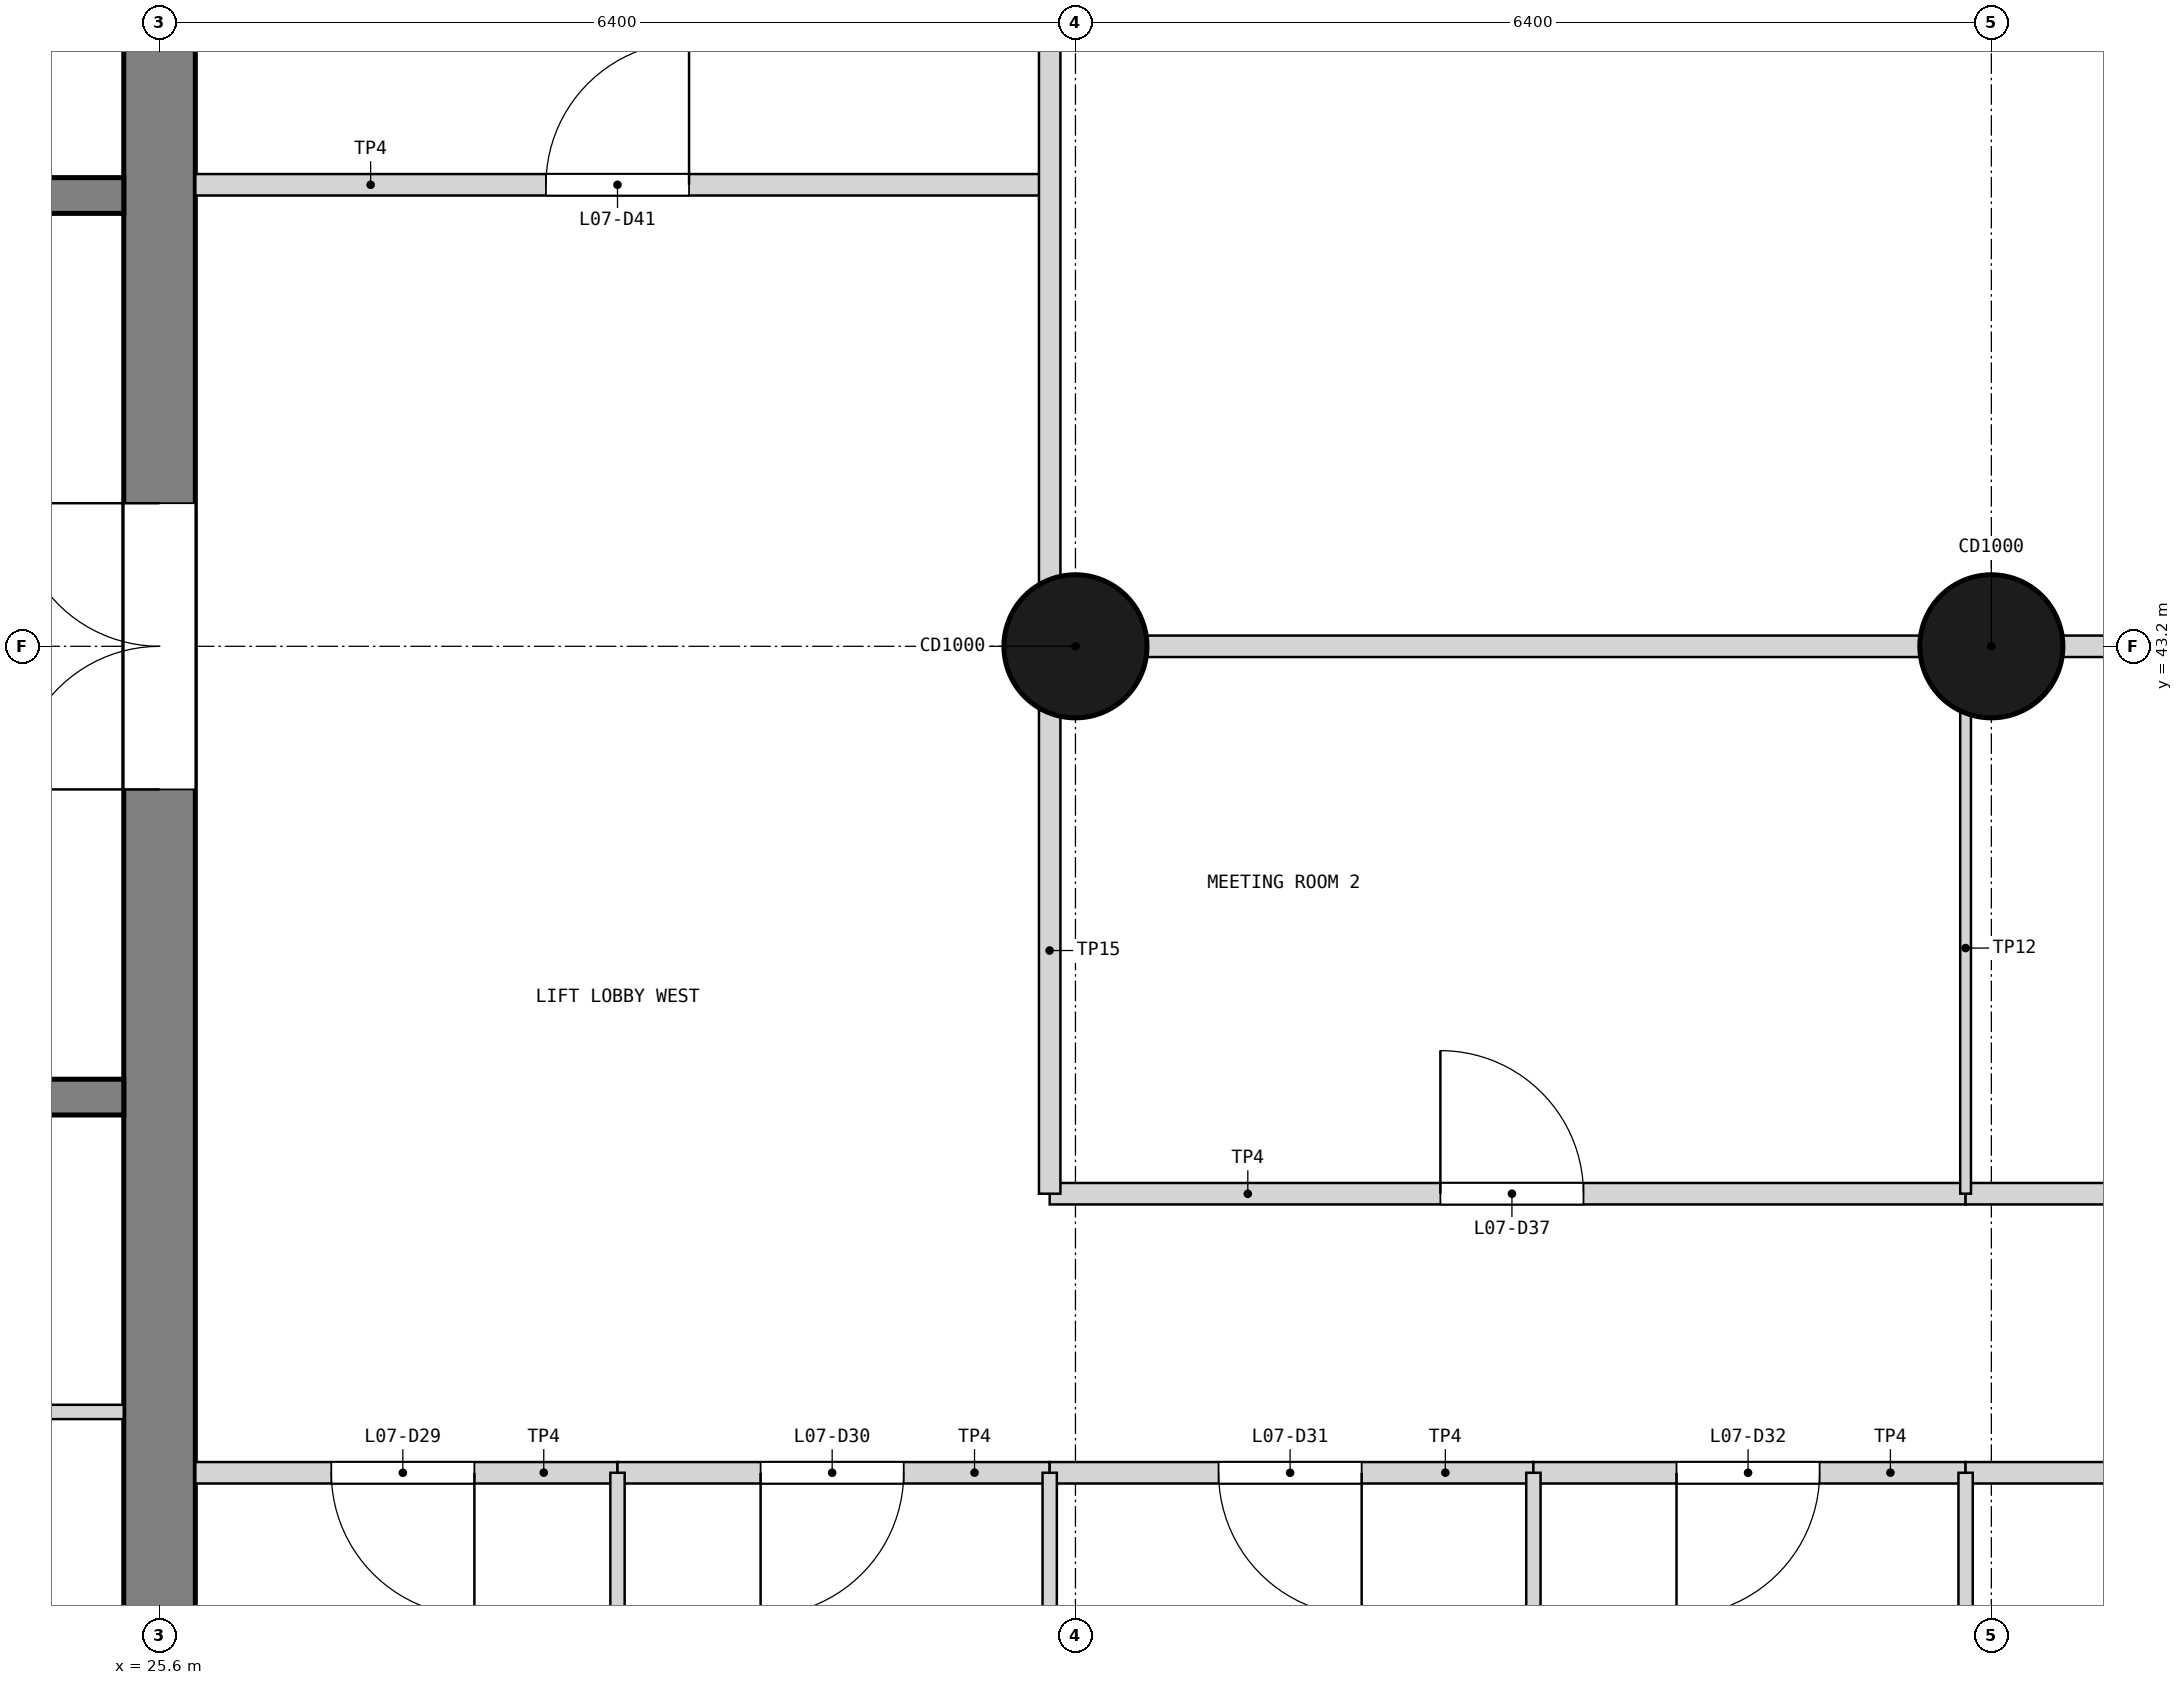
"""IFC4 building model, lengths in metres.
Left out: names, types, materials, properties, quantities, classifications, styles, units other than length and angle.
Written with IfcOpenShell. Run it as: python <this file> out.ifc"""

import sys

from ifc_helpers import new_model, si_unit, direction, frame, frame_2d, origin, origin_2d, place, context, subcontext, project, spatial, rectangle, circle, extrude, element, fill, save


model = new_model("IFC4")
c1 = context("Model", 3, precision=1e-05, world=origin(), true_north=direction((0.0, 1.0)))
c2 = subcontext(c1, "Body", "Model", "MODEL_VIEW")
j1 = project(units=[si_unit("LENGTHUNIT", "METRE"), si_unit("PLANEANGLEUNIT", "RADIAN")], contexts=[c1])
p1 = place(None, origin())
s1 = spatial("IfcSite", under=j1, at=p1, CompositionType="ELEMENT")
p2 = place(p1, origin())
s2 = spatial("IfcBuilding", under=s1, at=p2, CompositionType="ELEMENT")
p3 = place(p2, frame((0.0, 0.0, 28.8)))
s3 = spatial("IfcBuildingStorey", under=s2, at=p3, CompositionType="ELEMENT", Elevation=28.8)
p4 = place(p3, frame((25.6, 33.85, 0.0), z_axis=(0.0, 0.0, 1.0), x_axis=(0.0, 1.0, 0.0)))
e1 = element("IfcWall", 1, at=p4, inside=s3, PredefinedType="SHEAR", context=c2, shape_type="SweptSolid", body=[
    extrude(rectangle(XDim=18.7, YDim=0.5, at=frame_2d((9.35, 0.0))), origin(), (0.0, 0.0, 1.0), 3.9),
])
p5 = place(p4, frame((8.35, 0.0, 0.0)))
e2 = element("IfcOpeningElement", 2, at=p5, cuts=e1, PredefinedType="OPENING", context=c2, shape_type="SweptSolid", body=[
    extrude(rectangle(XDim=2.0, YDim=2.1, at=frame_2d((1.0, 1.05))), frame((0.0, 0.26, 0.0), z_axis=(0.0, -1.0, 0.0), x_axis=(1.0, 0.0, 0.0)), (0.0, 0.0, 1.0), 0.52),
])
for number, where, z_axis, x_axis in (
    (3, (32.0, 43.2, 0.0), (0.0, 0.0, 1.0), (1.0, 0.0, 0.0)),
    (4, (38.4, 43.2, 0.0), (0.0, 0.0, 1.0), (1.0, 0.0, 0.0)),
):
    element("IfcColumn", number, at=place(p3, frame(where, z_axis=z_axis, x_axis=x_axis)), inside=s3, PredefinedType="COLUMN", context=c2, shape_type="SweptSolid", body=[
        extrude(circle(Radius=0.5, at=origin_2d()), origin(), (0.0, 0.0, 1.0), 3.9),
    ])
for number, where, z_axis, x_axis in (
    (5, (19.875, 40.05, 0.0), (0.0, 0.0, 1.0), (1.0, 0.0, 0.0)),
    (6, (19.875, 46.35, 0.0), (0.0, 0.0, 1.0), (1.0, 0.0, 0.0)),
):
    element("IfcWall", number, at=place(p3, frame(where, z_axis=z_axis, x_axis=x_axis)), inside=s3, PredefinedType="SOLIDWALL", context=c2, shape_type="SweptSolid", body=[
        extrude(rectangle(XDim=5.475, YDim=0.25, at=frame_2d((2.738, 0.0))), origin(), (0.0, 0.0, 1.0), 3.6),
    ])
p6 = place(p3, frame((21.675, 37.85, 0.0), z_axis=(0.0, 0.0, 1.0), x_axis=(1.0, 0.0, 0.0)))
e7 = element("IfcWall", 7, at=p6, inside=s3, PredefinedType="PARTITIONING", context=c2, shape_type="SweptSolid", body=[
    extrude(rectangle(XDim=3.675, YDim=0.1, at=frame_2d((1.837, 0.0))), origin(), (0.0, 0.0, 1.0), 3.6),
])
p7 = place(p3, frame((25.85, 37.425, 0.0), z_axis=(0.0, 0.0, 1.0), x_axis=(1.0, 0.0, 0.0)))
e8 = element("IfcWall", 8, at=p7, inside=s3, PredefinedType="PARTITIONING", context=c2, shape_type="SweptSolid", body=[
    extrude(rectangle(XDim=2.95, YDim=0.15, at=frame_2d((1.475, 0.0))), origin(), (0.0, 0.0, 1.0), 3.68),
])
p8 = place(p7, frame((0.95, 0.0, 0.0)))
e9 = element("IfcOpeningElement", 9, at=p8, cuts=e8, PredefinedType="OPENING", context=c2, shape_type="SweptSolid", body=[
    extrude(rectangle(XDim=1.0, YDim=2.1, at=frame_2d((0.5, 1.05))), frame((0.0, 0.085, 0.0), z_axis=(0.0, -1.0, 0.0), x_axis=(1.0, 0.0, 0.0)), (0.0, 0.0, 1.0), 0.17),
])
p9 = place(p3, frame((28.8, 37.425, 0.0), z_axis=(0.0, 0.0, 1.0), x_axis=(1.0, 0.0, 0.0)))
e10 = element("IfcWall", 10, at=p9, inside=s3, PredefinedType="PARTITIONING", context=c2, shape_type="SweptSolid", body=[
    extrude(rectangle(XDim=3.02, YDim=0.15, at=frame_2d((1.51, 0.0))), origin(), (0.0, 0.0, 1.0), 3.68),
])
p10 = place(p9, frame((1.0, 0.0, 0.0)))
e11 = element("IfcOpeningElement", 11, at=p10, cuts=e10, PredefinedType="OPENING", context=c2, shape_type="SweptSolid", body=[
    extrude(rectangle(XDim=1.0, YDim=2.1, at=frame_2d((0.5, 1.05))), frame((0.0, 0.085, 0.0), z_axis=(0.0, -1.0, 0.0), x_axis=(1.0, 0.0, 0.0)), (0.0, 0.0, 1.0), 0.17),
])
p11 = place(p3, frame((31.82, 37.425, 0.0), z_axis=(0.0, 0.0, 1.0), x_axis=(1.0, 0.0, 0.0)))
e12 = element("IfcWall", 12, at=p11, inside=s3, PredefinedType="PARTITIONING", context=c2, shape_type="SweptSolid", body=[
    extrude(rectangle(XDim=3.38, YDim=0.15, at=frame_2d((1.69, 0.0))), origin(), (0.0, 0.0, 1.0), 3.68),
])
p12 = place(p11, frame((1.18, 0.0, 0.0)))
e13 = element("IfcOpeningElement", 13, at=p12, cuts=e12, PredefinedType="OPENING", context=c2, shape_type="SweptSolid", body=[
    extrude(rectangle(XDim=1.0, YDim=2.1, at=frame_2d((0.5, 1.05))), frame((0.0, 0.085, 0.0), z_axis=(0.0, -1.0, 0.0), x_axis=(1.0, 0.0, 0.0)), (0.0, 0.0, 1.0), 0.17),
])
p13 = place(p3, frame((35.2, 37.425, 0.0), z_axis=(0.0, 0.0, 1.0), x_axis=(1.0, 0.0, 0.0)))
e14 = element("IfcWall", 14, at=p13, inside=s3, PredefinedType="PARTITIONING", context=c2, shape_type="SweptSolid", body=[
    extrude(rectangle(XDim=3.02, YDim=0.15, at=frame_2d((1.51, 0.0))), origin(), (0.0, 0.0, 1.0), 3.68),
])
p14 = place(p13, frame((1.0, 0.0, 0.0)))
e15 = element("IfcOpeningElement", 15, at=p14, cuts=e14, PredefinedType="OPENING", context=c2, shape_type="SweptSolid", body=[
    extrude(rectangle(XDim=1.0, YDim=2.1, at=frame_2d((0.5, 1.05))), frame((0.0, 0.085, 0.0), z_axis=(0.0, -1.0, 0.0), x_axis=(1.0, 0.0, 0.0)), (0.0, 0.0, 1.0), 0.17),
])
p15 = place(p3, frame((38.22, 37.425, 0.0), z_axis=(0.0, 0.0, 1.0), x_axis=(1.0, 0.0, 0.0)))
e16 = element("IfcWall", 16, at=p15, inside=s3, PredefinedType="PARTITIONING", context=c2, shape_type="SweptSolid", body=[
    extrude(rectangle(XDim=13.16, YDim=0.15, at=frame_2d((6.58, 0.0))), origin(), (0.0, 0.0, 1.0), 3.68),
])
p16 = place(p15, frame((2.43, 0.0, 0.0)))
e17 = element("IfcOpeningElement", 17, at=p16, cuts=e16, PredefinedType="OPENING", context=c2, shape_type="SweptSolid", body=[
    extrude(rectangle(XDim=1.8, YDim=2.1, at=frame_2d((0.9, 1.05))), frame((0.0, 0.085, 0.0), z_axis=(0.0, -1.0, 0.0), x_axis=(1.0, 0.0, 0.0)), (0.0, 0.0, 1.0), 0.17),
])
p17 = place(p15, frame((8.93, 0.0, 0.0)))
e18 = element("IfcOpeningElement", 18, at=p17, cuts=e16, PredefinedType="OPENING", context=c2, shape_type="SweptSolid", body=[
    extrude(rectangle(XDim=1.8, YDim=2.1, at=frame_2d((0.9, 1.05))), frame((0.0, 0.085, 0.0), z_axis=(0.0, -1.0, 0.0), x_axis=(1.0, 0.0, 0.0)), (0.0, 0.0, 1.0), 0.17),
])
p18 = place(p3, frame((28.8, 31.3, 0.0), z_axis=(0.0, 0.0, 1.0), x_axis=(0.0, 1.0, 0.0)))
e19 = element("IfcWall", 19, at=p18, inside=s3, PredefinedType="PARTITIONING", context=c2, shape_type="SweptSolid", body=[
    extrude(rectangle(XDim=6.125, YDim=0.1, at=frame_2d((3.062, 0.0))), origin(), (0.0, 0.0, 1.0), 3.08),
])
p19 = place(p3, frame((31.82, 34.18, 0.0), z_axis=(0.0, 0.0, 1.0), x_axis=(0.0, 1.0, 0.0)))
e20 = element("IfcWall", 20, at=p19, inside=s3, PredefinedType="PARTITIONING", context=c2, shape_type="SweptSolid", body=[
    extrude(rectangle(XDim=3.245, YDim=0.1, at=frame_2d((1.623, 0.0))), origin(), (0.0, 0.0, 1.0), 2.78),
])
p20 = place(p3, frame((35.2, 31.3, 0.0), z_axis=(0.0, 0.0, 1.0), x_axis=(0.0, 1.0, 0.0)))
e21 = element("IfcWall", 21, at=p20, inside=s3, PredefinedType="PARTITIONING", context=c2, shape_type="SweptSolid", body=[
    extrude(rectangle(XDim=6.125, YDim=0.1, at=frame_2d((3.062, 0.0))), origin(), (0.0, 0.0, 1.0), 3.08),
])
p21 = place(p3, frame((38.22, 34.18, 0.0), z_axis=(0.0, 0.0, 1.0), x_axis=(0.0, 1.0, 0.0)))
e22 = element("IfcWall", 22, at=p21, inside=s3, PredefinedType="PARTITIONING", context=c2, shape_type="SweptSolid", body=[
    extrude(rectangle(XDim=3.245, YDim=0.1, at=frame_2d((1.623, 0.0))), origin(), (0.0, 0.0, 1.0), 2.78),
])
p22 = place(p3, frame((31.82, 39.375, 0.0), z_axis=(0.0, 0.0, 1.0), x_axis=(1.0, 0.0, 0.0)))
e23 = element("IfcWall", 23, at=p22, inside=s3, PredefinedType="PARTITIONING", context=c2, shape_type="SweptSolid", body=[
    extrude(rectangle(XDim=6.4, YDim=0.15, at=frame_2d((3.2, 0.0))), origin(), (0.0, 0.0, 1.0), 3.68),
])
p23 = place(p22, frame((2.73, 0.0, 0.0)))
e24 = element("IfcOpeningElement", 24, at=p23, cuts=e23, PredefinedType="OPENING", context=c2, shape_type="SweptSolid", body=[
    extrude(rectangle(XDim=1.0, YDim=2.1, at=frame_2d((0.5, 1.05))), frame((0.0, 0.085, 0.0), z_axis=(0.0, -1.0, 0.0), x_axis=(1.0, 0.0, 0.0)), (0.0, 0.0, 1.0), 0.17),
])
p24 = place(p3, frame((38.22, 39.375, 0.0), z_axis=(0.0, 0.0, 1.0), x_axis=(1.0, 0.0, 0.0)))
e25 = element("IfcWall", 25, at=p24, inside=s3, PredefinedType="PARTITIONING", context=c2, shape_type="SweptSolid", body=[
    extrude(rectangle(XDim=6.4, YDim=0.15, at=frame_2d((3.2, 0.0))), origin(), (0.0, 0.0, 1.0), 3.68),
])
p25 = place(p24, frame((2.68, 0.0, 0.0)))
e26 = element("IfcOpeningElement", 26, at=p25, cuts=e25, PredefinedType="OPENING", context=c2, shape_type="SweptSolid", body=[
    extrude(rectangle(XDim=1.0, YDim=2.1, at=frame_2d((0.5, 1.05))), frame((0.0, 0.085, 0.0), z_axis=(0.0, -1.0, 0.0), x_axis=(1.0, 0.0, 0.0)), (0.0, 0.0, 1.0), 0.17),
])
p26 = place(p3, frame((38.22, 39.375, 0.0), z_axis=(0.0, 0.0, 1.0), x_axis=(0.0, 1.0, 0.0)))
e27 = element("IfcWall", 27, at=p26, inside=s3, PredefinedType="PARTITIONING", context=c2, shape_type="SweptSolid", body=[
    extrude(rectangle(XDim=3.378, YDim=0.075, at=frame_2d((1.689, 0.0))), origin(), (0.0, 0.0, 1.0), 2.78),
])
p27 = place(p3, frame((31.82, 43.2, 0.0), z_axis=(0.0, 0.0, 1.0), x_axis=(1.0, 0.0, 0.0)))
e28 = element("IfcWall", 28, at=p27, inside=s3, PredefinedType="PARTITIONING", context=c2, shape_type="SweptSolid", body=[
    extrude(rectangle(XDim=25.96, YDim=0.15, at=frame_2d((12.98, 0.0))), origin(), (0.0, 0.0, 1.0), 2.88),
])
p28 = place(p27, frame((13.825, 0.0, 0.0)))
e29 = element("IfcOpeningElement", 29, at=p28, cuts=e28, PredefinedType="OPENING", context=c2, shape_type="SweptSolid", body=[
    extrude(rectangle(XDim=1.8, YDim=2.1, at=frame_2d((0.9, 1.05))), frame((0.0, 0.085, 0.0), z_axis=(0.0, -1.0, 0.0), x_axis=(1.0, 0.0, 0.0)), (0.0, 0.0, 1.0), 0.17),
])
p29 = place(p27, frame((16.775, 0.0, 0.0)))
e30 = element("IfcOpeningElement", 30, at=p29, cuts=e28, PredefinedType="OPENING", context=c2, shape_type="SweptSolid", body=[
    extrude(rectangle(XDim=1.8, YDim=2.1, at=frame_2d((0.9, 1.05))), frame((0.0, 0.085, 0.0), z_axis=(0.0, -1.0, 0.0), x_axis=(1.0, 0.0, 0.0)), (0.0, 0.0, 1.0), 0.17),
])
p30 = place(p3, frame((25.85, 46.425, 0.0), z_axis=(0.0, 0.0, 1.0), x_axis=(1.0, 0.0, 0.0)))
e31 = element("IfcWall", 31, at=p30, inside=s3, PredefinedType="PARTITIONING", context=c2, shape_type="SweptSolid", body=[
    extrude(rectangle(XDim=5.97, YDim=0.15, at=frame_2d((2.985, 0.0))), origin(), (0.0, 0.0, 1.0), 3.68),
])
p31 = place(p30, frame((2.45, 0.0, 0.0)))
e32 = element("IfcOpeningElement", 32, at=p31, cuts=e31, PredefinedType="OPENING", context=c2, shape_type="SweptSolid", body=[
    extrude(rectangle(XDim=1.0, YDim=2.1, at=frame_2d((0.5, 1.05))), frame((0.0, 0.085, 0.0), z_axis=(0.0, -1.0, 0.0), x_axis=(1.0, 0.0, 0.0)), (0.0, 0.0, 1.0), 0.17),
])
p32 = place(p3, frame((31.82, 39.375, 0.0), z_axis=(0.0, 0.0, 1.0), x_axis=(0.0, 1.0, 0.0)))
e33 = element("IfcWall", 33, at=p32, inside=s3, PredefinedType="PARTITIONING", context=c2, shape_type="SweptSolid", body=[
    extrude(rectangle(XDim=3.378, YDim=0.15, at=frame_2d((1.689, 0.0))), origin(), (0.0, 0.0, 1.0), 2.78),
])
p33 = place(p3, frame((31.82, 43.646, 0.0), z_axis=(0.0, 0.0, 1.0), x_axis=(0.0, 1.0, 0.0)))
e34 = element("IfcWall", 34, at=p33, inside=s3, PredefinedType="PARTITIONING", context=c2, shape_type="SweptSolid", body=[
    extrude(rectangle(XDim=8.573, YDim=0.15, at=frame_2d((4.287, 0.0))), origin(), (0.0, 0.0, 1.0), 2.78),
])
p34 = place(p5, origin())
e35 = element("IfcDoor", 35, at=p34, inside=s3, OperationType="DOUBLE_DOOR_SINGLE_SWING", PredefinedType="DOOR", context=c2, shape_type="SweptSolid", body=[
    extrude(rectangle(XDim=2.0, YDim=2.1, at=frame_2d((1.0, 1.05))), frame((0.0, 0.025, 0.0), z_axis=(0.0, -1.0, 0.0), x_axis=(1.0, 0.0, 0.0)), (0.0, 0.0, 1.0), 0.05),
])
fill(e2, e35)
p35 = place(p8, frame((1.0, 0.0, 0.0), z_axis=(0.0, 0.0, 1.0), x_axis=(-1.0, 0.0, 0.0)))
e36 = element("IfcDoor", 36, at=p35, inside=s3, OperationType="SINGLE_SWING_LEFT", PredefinedType="DOOR", context=c2, shape_type="SweptSolid", body=[
    extrude(rectangle(XDim=1.0, YDim=2.1, at=frame_2d((0.5, 1.05))), frame((0.0, 0.025, 0.0), z_axis=(0.0, -1.0, 0.0), x_axis=(1.0, 0.0, 0.0)), (0.0, 0.0, 1.0), 0.05),
])
fill(e9, e36)
p36 = place(p10, frame((1.0, 0.0, 0.0), z_axis=(0.0, 0.0, 1.0), x_axis=(-1.0, 0.0, 0.0)))
e37 = element("IfcDoor", 37, at=p36, inside=s3, OperationType="SINGLE_SWING_RIGHT", PredefinedType="DOOR", context=c2, shape_type="SweptSolid", body=[
    extrude(rectangle(XDim=1.0, YDim=2.1, at=frame_2d((0.5, 1.05))), frame((0.0, 0.025, 0.0), z_axis=(0.0, -1.0, 0.0), x_axis=(1.0, 0.0, 0.0)), (0.0, 0.0, 1.0), 0.05),
])
fill(e11, e37)
p37 = place(p12, frame((1.0, 0.0, 0.0), z_axis=(0.0, 0.0, 1.0), x_axis=(-1.0, 0.0, 0.0)))
e38 = element("IfcDoor", 38, at=p37, inside=s3, OperationType="SINGLE_SWING_LEFT", PredefinedType="DOOR", context=c2, shape_type="SweptSolid", body=[
    extrude(rectangle(XDim=1.0, YDim=2.1, at=frame_2d((0.5, 1.05))), frame((0.0, 0.025, 0.0), z_axis=(0.0, -1.0, 0.0), x_axis=(1.0, 0.0, 0.0)), (0.0, 0.0, 1.0), 0.05),
])
fill(e13, e38)
p38 = place(p14, frame((1.0, 0.0, 0.0), z_axis=(0.0, 0.0, 1.0), x_axis=(-1.0, 0.0, 0.0)))
e39 = element("IfcDoor", 39, at=p38, inside=s3, OperationType="SINGLE_SWING_RIGHT", PredefinedType="DOOR", context=c2, shape_type="SweptSolid", body=[
    extrude(rectangle(XDim=1.0, YDim=2.1, at=frame_2d((0.5, 1.05))), frame((0.0, 0.025, 0.0), z_axis=(0.0, -1.0, 0.0), x_axis=(1.0, 0.0, 0.0)), (0.0, 0.0, 1.0), 0.05),
])
fill(e15, e39)
p39 = place(p23, origin())
e40 = element("IfcDoor", 40, at=p39, inside=s3, OperationType="SINGLE_SWING_LEFT", PredefinedType="DOOR", context=c2, shape_type="SweptSolid", body=[
    extrude(rectangle(XDim=1.0, YDim=2.1, at=frame_2d((0.5, 1.05))), frame((0.0, 0.025, 0.0), z_axis=(0.0, -1.0, 0.0), x_axis=(1.0, 0.0, 0.0)), (0.0, 0.0, 1.0), 0.05),
])
fill(e24, e40)
p40 = place(p31, origin())
e41 = element("IfcDoor", 41, at=p40, inside=s3, OperationType="SINGLE_SWING_RIGHT", PredefinedType="DOOR", context=c2, shape_type="SweptSolid", body=[
    extrude(rectangle(XDim=1.0, YDim=2.1, at=frame_2d((0.5, 1.05))), frame((0.0, 0.025, 0.0), z_axis=(0.0, -1.0, 0.0), x_axis=(1.0, 0.0, 0.0)), (0.0, 0.0, 1.0), 0.05),
])
fill(e32, e41)
save(model, sys.argv[1])
